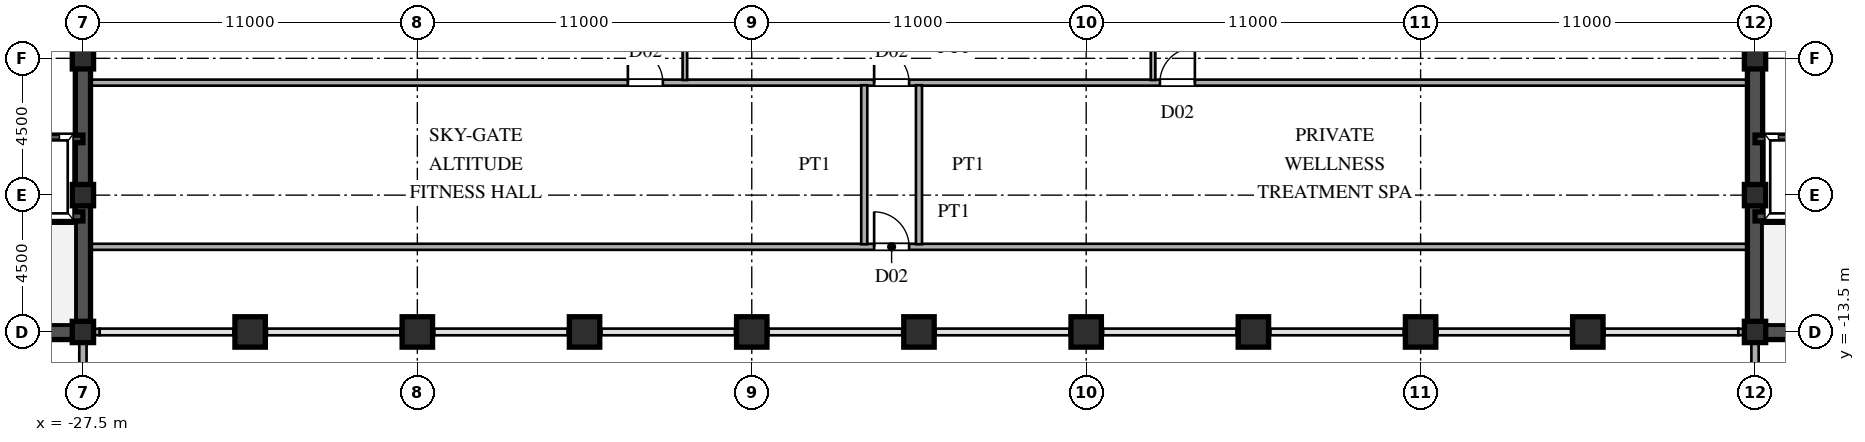
"""IFC4 building model, lengths in metres.
Left out: names, types, materials, properties, quantities, classifications, styles, units other than length and angle.
Written with IfcOpenShell. Run it as: python <this file> out.ifc"""

import sys

from ifc_helpers import new_model, si_unit, direction, frame, frame_2d, origin, origin_2d, place, context, subcontext, project, spatial, rectangle, hollow_rectangle, extrude, source, transform, mapped, element, fill, save


model = new_model("IFC4")
c1 = context("Model", 3, precision=1e-05, world=origin(), true_north=direction((0.0, 1.0)))
c2 = subcontext(c1, "Body", "Model", "MODEL_VIEW")
j1 = project(units=[si_unit("LENGTHUNIT", "METRE"), si_unit("PLANEANGLEUNIT", "RADIAN")], contexts=[c1])
p1 = place(None, origin())
s1 = spatial("IfcSite", under=j1, at=p1, CompositionType="ELEMENT")
p2 = place(p1, origin())
s2 = spatial("IfcBuilding", under=s1, at=p2, CompositionType="ELEMENT")
p3 = place(p2, frame((0.0, 0.0, 234.6)))
s3 = spatial("IfcBuildingStorey", under=s2, at=p3, CompositionType="ELEMENT", Elevation=234.6)
m1 = source(origin(), c2, "Body", "SweptSolid", [
    extrude(hollow_rectangle(XDim=0.7, YDim=0.7, WallThickness=0.03, at=origin_2d()), origin(), (0.0, 0.0, 1.0), 4.8),
])
for number, where, z_axis, x_axis in (
    (1, (-27.5, -13.5, 0.0), (0.0, 0.0, 1.0), (1.0, 0.0, 0.0)),
    (2, (-27.5, -9.0, 0.0), (0.0, 0.0, 1.0), (1.0, 0.0, 0.0)),
    (3, (-27.5, -4.5, 0.0), (0.0, 0.0, 1.0), (1.0, 0.0, 0.0)),
    (4, (27.5, -13.5, 0.0), (0.0, 0.0, 1.0), (1.0, 0.0, 0.0)),
    (5, (27.5, -9.0, 0.0), (0.0, 0.0, 1.0), (1.0, 0.0, 0.0)),
    (6, (27.5, -4.5, 0.0), (0.0, 0.0, 1.0), (1.0, 0.0, 0.0)),
):
    element("IfcColumn", number, at=place(p3, frame(where, z_axis=z_axis, x_axis=x_axis)), inside=s3, PredefinedType="COLUMN", context=c2, shape_type="MappedRepresentation", body=[
        mapped(m1, transform((0.0, 0.0, 0.0), scale=1.0)),
    ])
m2 = source(origin(), c2, "Body", "SweptSolid", [
    extrude(hollow_rectangle(XDim=1.0, YDim=1.0, WallThickness=0.042, at=origin_2d()), origin(), (0.0, 0.0, 1.0), 4.8),
])
for number, where, z_axis, x_axis in (
    (7, (-22.0, -13.5, 0.0), (0.0, 0.0, 1.0), (1.0, 0.0, 0.0)),
    (8, (-16.5, -13.5, 0.0), (0.0, 0.0, 1.0), (1.0, 0.0, 0.0)),
    (9, (-11.0, -13.5, 0.0), (0.0, 0.0, 1.0), (1.0, 0.0, 0.0)),
    (10, (-5.5, -13.5, 0.0), (0.0, 0.0, 1.0), (1.0, 0.0, 0.0)),
    (11, (0.0, -13.5, 0.0), (0.0, 0.0, 1.0), (1.0, 0.0, 0.0)),
    (12, (5.5, -13.5, 0.0), (0.0, 0.0, 1.0), (1.0, 0.0, 0.0)),
    (13, (11.0, -13.5, 0.0), (0.0, 0.0, 1.0), (1.0, 0.0, 0.0)),
    (14, (16.5, -13.5, 0.0), (0.0, 0.0, 1.0), (1.0, 0.0, 0.0)),
    (15, (22.0, -13.5, 0.0), (0.0, 0.0, 1.0), (1.0, 0.0, 0.0)),
):
    element("IfcColumn", number, at=place(p3, frame(where, z_axis=z_axis, x_axis=x_axis)), inside=s3, PredefinedType="COLUMN", context=c2, shape_type="MappedRepresentation", body=[
        mapped(m2, transform((0.0, 0.0, 0.0), scale=1.0)),
    ])
p4 = place(p3, frame((-27.5, -15.98, 0.0), z_axis=(0.0, 0.0, 1.0), x_axis=(0.0, 1.0, 0.0)))
e16 = element("IfcWall", 16, at=p4, inside=s3, PredefinedType="SOLIDWALL", context=c2, shape_type="SweptSolid", body=[
    extrude(rectangle(XDim=1.605, YDim=0.24, at=frame_2d((0.803, 0.0))), origin(), (0.0, 0.0, 1.0), 4.58),
])
p5 = place(p3, frame((-27.5, -14.375, 0.0), z_axis=(0.0, 0.0, 1.0), x_axis=(0.0, 1.0, 0.0)))
e17 = element("IfcWall", 17, at=p5, inside=s3, PredefinedType="SOLIDWALL", context=c2, shape_type="SweptSolid", body=[
    extrude(rectangle(XDim=0.62, YDim=0.24, at=frame_2d((0.31, 0.0))), origin(), (0.0, 0.0, 1.0), 4.08),
])
p6 = place(p3, frame((27.5, -15.98, 0.0), z_axis=(0.0, 0.0, 1.0), x_axis=(0.0, 1.0, 0.0)))
e18 = element("IfcWall", 18, at=p6, inside=s3, PredefinedType="SOLIDWALL", context=c2, shape_type="SweptSolid", body=[
    extrude(rectangle(XDim=1.605, YDim=0.24, at=frame_2d((0.803, 0.0))), origin(), (0.0, 0.0, 1.0), 4.58),
])
p7 = place(p3, frame((27.5, -14.375, 0.0), z_axis=(0.0, 0.0, 1.0), x_axis=(0.0, 1.0, 0.0)))
e19 = element("IfcWall", 19, at=p7, inside=s3, PredefinedType="SOLIDWALL", context=c2, shape_type="SweptSolid", body=[
    extrude(rectangle(XDim=0.62, YDim=0.24, at=frame_2d((0.31, 0.0))), origin(), (0.0, 0.0, 1.0), 4.08),
])
p8 = place(p3, frame((-27.49, -13.5, 0.0), z_axis=(0.0, 0.0, 1.0), x_axis=(1.0, 0.0, 0.0)))
e20 = element("IfcWall", 20, at=p8, inside=s3, PredefinedType="SOLIDWALL", context=c2, shape_type="SweptSolid", body=[
    extrude(rectangle(XDim=0.54, YDim=0.21, at=frame_2d((0.27, 0.0))), origin(), (0.0, 0.0, 1.0), 2.78),
])
for number, where, z_axis, x_axis in (
    (21, (-22.55, -13.5, 0.0), (0.0, 0.0, 1.0), (1.0, 0.0, 0.0)),
    (22, (-17.05, -13.5, 0.0), (0.0, 0.0, 1.0), (1.0, 0.0, 0.0)),
    (23, (-11.55, -13.5, 0.0), (0.0, 0.0, 1.0), (1.0, 0.0, 0.0)),
    (24, (-6.05, -13.5, 0.0), (0.0, 0.0, 1.0), (1.0, 0.0, 0.0)),
    (25, (-0.55, -13.5, 0.0), (0.0, 0.0, 1.0), (1.0, 0.0, 0.0)),
    (26, (4.95, -13.5, 0.0), (0.0, 0.0, 1.0), (1.0, 0.0, 0.0)),
    (27, (10.45, -13.5, 0.0), (0.0, 0.0, 1.0), (1.0, 0.0, 0.0)),
    (28, (15.95, -13.5, 0.0), (0.0, 0.0, 1.0), (1.0, 0.0, 0.0)),
    (29, (21.45, -13.5, 0.0), (0.0, 0.0, 1.0), (1.0, 0.0, 0.0)),
):
    element("IfcWall", number, at=place(p3, frame(where, z_axis=z_axis, x_axis=x_axis)), inside=s3, PredefinedType="SOLIDWALL", context=c2, shape_type="SweptSolid", body=[
        extrude(rectangle(XDim=1.1, YDim=0.21, at=frame_2d((0.55, 0.0))), origin(), (0.0, 0.0, 1.0), 2.78),
    ])
p9 = place(p3, frame((26.95, -13.5, 0.0), z_axis=(0.0, 0.0, 1.0), x_axis=(1.0, 0.0, 0.0)))
e30 = element("IfcWall", 30, at=p9, inside=s3, PredefinedType="SOLIDWALL", context=c2, shape_type="SweptSolid", body=[
    extrude(rectangle(XDim=0.54, YDim=0.21, at=frame_2d((0.27, 0.0))), origin(), (0.0, 0.0, 1.0), 2.78),
])
p10 = place(p3, frame((-27.5, -13.5, 0.0), z_axis=(0.0, 0.0, 1.0), x_axis=(0.0, 1.0, 0.0)))
e31 = element("IfcWall", 31, at=p10, inside=s3, PredefinedType="SHEAR", context=c2, shape_type="SweptSolid", body=[
    extrude(rectangle(XDim=12.2, YDim=0.5, at=frame_2d((6.1, 0.0))), origin(), (0.0, 0.0, 1.0), 4.58),
])
p11 = place(p3, frame((-36.5, -13.5, 0.0), z_axis=(0.0, 0.0, 1.0), x_axis=(1.0, 0.0, 0.0)))
e32 = element("IfcWall", 32, at=p11, inside=s3, PredefinedType="SHEAR", context=c2, shape_type="SweptSolid", body=[
    extrude(rectangle(XDim=9.0, YDim=0.5, at=frame_2d((4.5, 0.0))), origin(), (0.0, 0.0, 1.0), 4.58),
])
p12 = place(p3, frame((-36.5, -9.7, 0.0), z_axis=(0.0, 0.0, 1.0), x_axis=(1.0, 0.0, 0.0)))
e33 = element("IfcWall", 33, at=p12, inside=s3, PredefinedType="SHEAR", context=c2, shape_type="SweptSolid", body=[
    extrude(rectangle(XDim=9.0, YDim=0.3, at=frame_2d((4.5, 0.0))), origin(), (0.0, 0.0, 1.0), 4.58),
])
p13 = place(p12, frame((0.6, 0.0, 0.0)))
e34 = element("IfcOpeningElement", 34, at=p13, cuts=e33, PredefinedType="OPENING", context=c2, shape_type="SweptSolid", body=[
    extrude(rectangle(XDim=1.1, YDim=2.2, at=frame_2d((0.55, 1.1))), frame((0.0, 0.16, 0.0), z_axis=(0.0, -1.0, 0.0), x_axis=(1.0, 0.0, 0.0)), (0.0, 0.0, 1.0), 0.32),
])
p14 = place(p3, frame((-30.3, -7.15, 0.0), z_axis=(0.0, 0.0, 1.0), x_axis=(1.0, 0.0, 0.0)))
e35 = element("IfcWall", 35, at=p14, inside=s3, PredefinedType="SHEAR", context=c2, shape_type="SweptSolid", body=[
    extrude(rectangle(XDim=2.8, YDim=0.25, at=frame_2d((1.4, 0.0))), origin(), (0.0, 0.0, 1.0), 4.58),
])
p15 = place(p3, frame((27.5, -13.5, 0.0), z_axis=(0.0, 0.0, 1.0), x_axis=(0.0, 1.0, 0.0)))
e36 = element("IfcWall", 36, at=p15, inside=s3, PredefinedType="SHEAR", context=c2, shape_type="SweptSolid", body=[
    extrude(rectangle(XDim=12.2, YDim=0.5, at=frame_2d((6.1, 0.0))), origin(), (0.0, 0.0, 1.0), 4.58),
])
p16 = place(p3, frame((27.5, -13.5, 0.0), z_axis=(0.0, 0.0, 1.0), x_axis=(1.0, 0.0, 0.0)))
e37 = element("IfcWall", 37, at=p16, inside=s3, PredefinedType="SHEAR", context=c2, shape_type="SweptSolid", body=[
    extrude(rectangle(XDim=9.0, YDim=0.5, at=frame_2d((4.5, 0.0))), origin(), (0.0, 0.0, 1.0), 4.58),
])
p17 = place(p3, frame((27.5, -9.7, 0.0), z_axis=(0.0, 0.0, 1.0), x_axis=(1.0, 0.0, 0.0)))
e38 = element("IfcWall", 38, at=p17, inside=s3, PredefinedType="SHEAR", context=c2, shape_type="SweptSolid", body=[
    extrude(rectangle(XDim=9.0, YDim=0.3, at=frame_2d((4.5, 0.0))), origin(), (0.0, 0.0, 1.0), 4.58),
])
p18 = place(p17, frame((7.3, 0.0, 0.0)))
e39 = element("IfcOpeningElement", 39, at=p18, cuts=e38, PredefinedType="OPENING", context=c2, shape_type="SweptSolid", body=[
    extrude(rectangle(XDim=1.1, YDim=2.2, at=frame_2d((0.55, 1.1))), frame((0.0, 0.16, 0.0), z_axis=(0.0, -1.0, 0.0), x_axis=(1.0, 0.0, 0.0)), (0.0, 0.0, 1.0), 0.32),
])
p19 = place(p3, frame((27.5, -7.15, 0.0), z_axis=(0.0, 0.0, 1.0), x_axis=(1.0, 0.0, 0.0)))
e40 = element("IfcWall", 40, at=p19, inside=s3, PredefinedType="SHEAR", context=c2, shape_type="SweptSolid", body=[
    extrude(rectangle(XDim=2.8, YDim=0.25, at=frame_2d((1.4, 0.0))), origin(), (0.0, 0.0, 1.0), 4.58),
])
p20 = place(p3, frame((-27.245, -10.7, 0.0), z_axis=(0.0, 0.0, 1.0), x_axis=(1.0, 0.0, 0.0)))
e41 = element("IfcWall", 41, at=p20, inside=s3, PredefinedType="PARTITIONING", context=c2, shape_type="SweptSolid", body=[
    extrude(rectangle(XDim=54.49, YDim=0.2, at=frame_2d((27.245, 0.0))), origin(), (0.0, 0.0, 1.0), 4.58),
])
p21 = place(p20, frame((25.77, 0.0, 0.0)))
e42 = element("IfcOpeningElement", 42, at=p21, cuts=e41, PredefinedType="OPENING", context=c2, shape_type="SweptSolid", body=[
    extrude(rectangle(XDim=1.15, YDim=2.2, at=frame_2d((0.575, 1.1))), frame((0.0, 0.11, 0.0), z_axis=(0.0, -1.0, 0.0), x_axis=(1.0, 0.0, 0.0)), (0.0, 0.0, 1.0), 0.22),
])
p22 = place(p3, frame((-27.245, -5.3, 0.0), z_axis=(0.0, 0.0, 1.0), x_axis=(1.0, 0.0, 0.0)))
e43 = element("IfcWall", 43, at=p22, inside=s3, PredefinedType="PARTITIONING", context=c2, shape_type="SweptSolid", body=[
    extrude(rectangle(XDim=54.49, YDim=0.2, at=frame_2d((27.245, 0.0))), origin(), (0.0, 0.0, 1.0), 4.58),
])
p23 = place(p22, frame((25.77, 0.0, 0.0)))
e44 = element("IfcOpeningElement", 44, at=p23, cuts=e43, PredefinedType="OPENING", context=c2, shape_type="SweptSolid", body=[
    extrude(rectangle(XDim=1.15, YDim=2.2, at=frame_2d((0.575, 1.1))), frame((0.0, 0.11, 0.0), z_axis=(0.0, -1.0, 0.0), x_axis=(1.0, 0.0, 0.0)), (0.0, 0.0, 1.0), 0.22),
])
p24 = place(p22, frame((17.67, 0.0, 0.0)))
e45 = element("IfcOpeningElement", 45, at=p24, cuts=e43, PredefinedType="OPENING", context=c2, shape_type="SweptSolid", body=[
    extrude(rectangle(XDim=1.15, YDim=2.2, at=frame_2d((0.575, 1.1))), frame((0.0, 0.11, 0.0), z_axis=(0.0, -1.0, 0.0), x_axis=(1.0, 0.0, 0.0)), (0.0, 0.0, 1.0), 0.22),
])
p25 = place(p22, frame((35.17, 0.0, 0.0)))
e46 = element("IfcOpeningElement", 46, at=p25, cuts=e43, PredefinedType="OPENING", context=c2, shape_type="SweptSolid", body=[
    extrude(rectangle(XDim=1.15, YDim=2.2, at=frame_2d((0.575, 1.1))), frame((0.0, 0.11, 0.0), z_axis=(0.0, -1.0, 0.0), x_axis=(1.0, 0.0, 0.0)), (0.0, 0.0, 1.0), 0.22),
])
p26 = place(p3, frame((-7.7, -5.215, 0.0), z_axis=(0.0, 0.0, 1.0), x_axis=(0.0, 1.0, 0.0)))
e47 = element("IfcWall", 47, at=p26, inside=s3, PredefinedType="PARTITIONING", context=c2, shape_type="SweptSolid", body=[
    extrude(rectangle(XDim=3.78, YDim=0.15, at=frame_2d((1.89, 0.0))), origin(), (0.0, 0.0, 1.0), 4.58),
])
p27 = place(p3, frame((-1.8, -10.615, 0.0), z_axis=(0.0, 0.0, 1.0), x_axis=(0.0, 1.0, 0.0)))
e48 = element("IfcWall", 48, at=p27, inside=s3, PredefinedType="PARTITIONING", context=c2, shape_type="SweptSolid", body=[
    extrude(rectangle(XDim=5.23, YDim=0.2, at=frame_2d((2.615, 0.0))), origin(), (0.0, 0.0, 1.0), 4.58),
])
p28 = place(p3, frame((0.0, -10.615, 0.0), z_axis=(0.0, 0.0, 1.0), x_axis=(0.0, 1.0, 0.0)))
e49 = element("IfcWall", 49, at=p28, inside=s3, PredefinedType="PARTITIONING", context=c2, shape_type="SweptSolid", body=[
    extrude(rectangle(XDim=5.23, YDim=0.2, at=frame_2d((2.615, 0.0))), origin(), (0.0, 0.0, 1.0), 3.48),
])
p29 = place(p3, frame((7.7, -5.215, 0.0), z_axis=(0.0, 0.0, 1.0), x_axis=(0.0, 1.0, 0.0)))
e50 = element("IfcWall", 50, at=p29, inside=s3, PredefinedType="PARTITIONING", context=c2, shape_type="SweptSolid", body=[
    extrude(rectangle(XDim=3.78, YDim=0.15, at=frame_2d((1.89, 0.0))), origin(), (0.0, 0.0, 1.0), 4.58),
])
m3 = source(origin(), c2, "Body", "SweptSolid", [
    extrude(rectangle(XDim=1.15, YDim=2.2, at=frame_2d((0.575, 1.1))), frame((0.0, 0.025, 0.0), z_axis=(0.0, -1.0, 0.0), x_axis=(1.0, 0.0, 0.0)), (0.0, 0.0, 1.0), 0.05),
])
p30 = place(p21, origin())
e51 = element("IfcDoor", 51, at=p30, inside=s3, OperationType="SINGLE_SWING_LEFT", PredefinedType="DOOR", context=c2, shape_type="MappedRepresentation", body=[
    mapped(m3, transform((0.0, 0.0, 0.0), scale=1.0)),
])
fill(e42, e51)
p31 = place(p23, origin())
e52 = element("IfcDoor", 52, at=p31, inside=s3, OperationType="SINGLE_SWING_LEFT", PredefinedType="DOOR", context=c2, shape_type="MappedRepresentation", body=[
    mapped(m3, transform((0.0, 0.0, 0.0), scale=1.0)),
])
fill(e44, e52)
p32 = place(p24, origin())
e53 = element("IfcDoor", 53, at=p32, inside=s3, OperationType="SINGLE_SWING_LEFT", PredefinedType="DOOR", context=c2, shape_type="MappedRepresentation", body=[
    mapped(m3, transform((0.0, 0.0, 0.0), scale=1.0)),
])
fill(e45, e53)
p33 = place(p25, origin())
e54 = element("IfcDoor", 54, at=p33, inside=s3, OperationType="SINGLE_SWING_RIGHT", PredefinedType="DOOR", context=c2, shape_type="MappedRepresentation", body=[
    mapped(m3, transform((0.0, 0.0, 0.0), scale=1.0)),
])
fill(e46, e54)
save(model, sys.argv[1])
